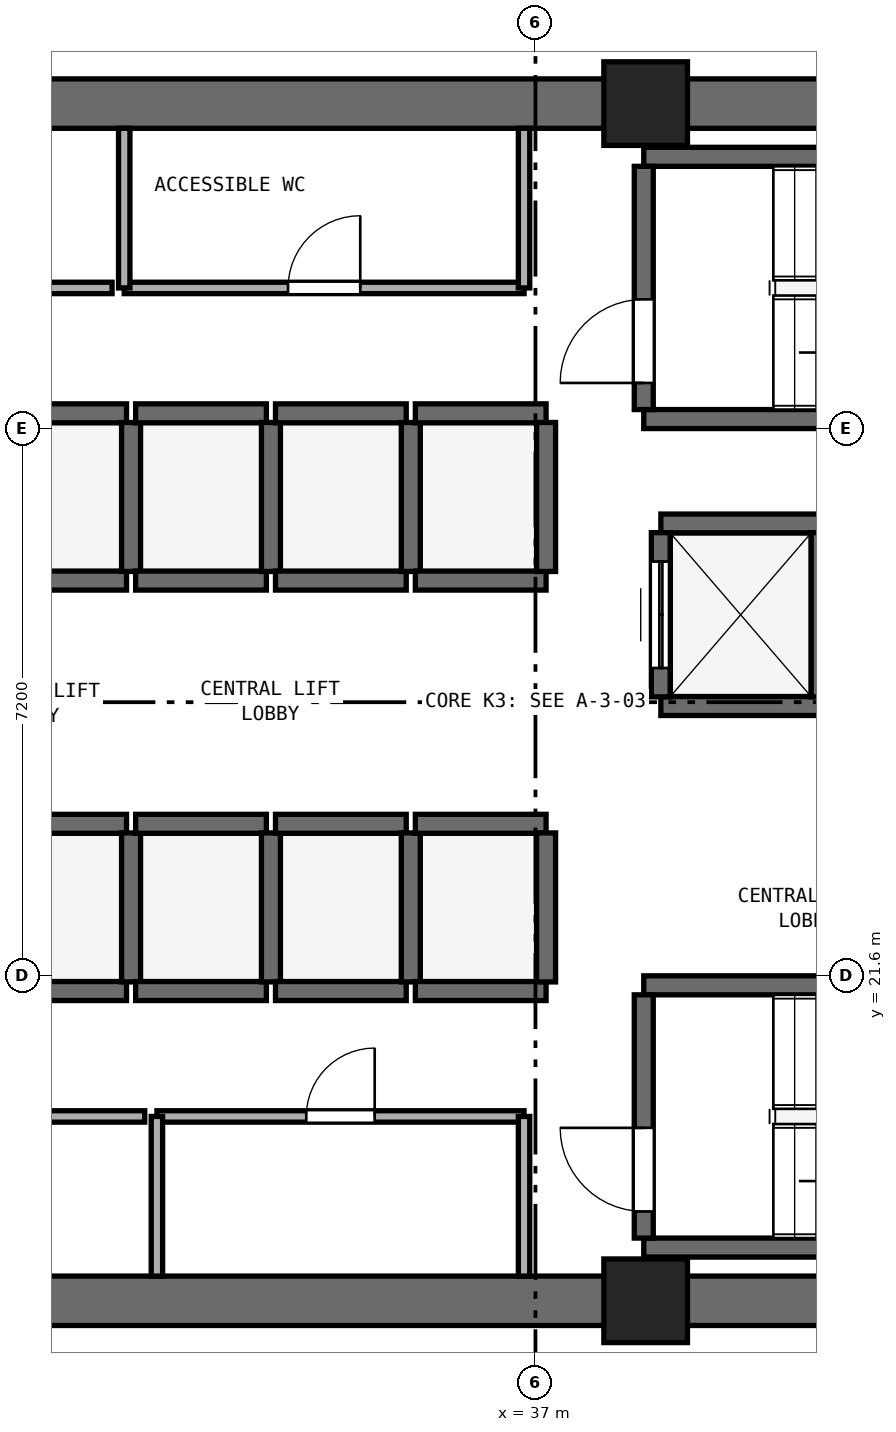
"""IFC4 building model, lengths in metres.
Left out: names, types, materials, properties, quantities, classifications, styles, units other than length and angle.
Written with IfcOpenShell. Run it as: python <this file> out.ifc"""

import sys

from ifc_helpers import new_model, si_unit, direction, frame, frame_2d, origin, origin_2d, place, context, subcontext, project, spatial, rectangle, extrude, element, fill, save


model = new_model("IFC4")
c1 = context("Model", 3, precision=1e-05, world=origin(), true_north=direction((0.0, 1.0)))
c2 = subcontext(c1, "Body", "Model", "MODEL_VIEW")
j1 = project(units=[si_unit("LENGTHUNIT", "METRE"), si_unit("PLANEANGLEUNIT", "RADIAN")], contexts=[c1])
p1 = place(None, origin())
s1 = spatial("IfcSite", under=j1, at=p1, CompositionType="ELEMENT")
p2 = place(p1, origin())
s2 = spatial("IfcBuilding", under=s1, at=p2, CompositionType="ELEMENT")
p3 = place(p2, frame((0.0, 0.0, 74.4)))
s3 = spatial("IfcBuildingStorey", under=s2, at=p3, CompositionType="ELEMENT", Elevation=74.4)
for number, where, z_axis, x_axis in (
    (1, (25.4, 17.325, 0.0), (0.0, 0.0, 1.0), (1.0, 0.0, 0.0)),
    (2, (25.4, 33.075, 0.0), (0.0, 0.0, 1.0), (1.0, 0.0, 0.0)),
):
    element("IfcWall", number, at=place(p3, frame(where, z_axis=z_axis, x_axis=x_axis)), inside=s3, PredefinedType="SHEAR", context=c2, shape_type="SweptSolid", body=[
        extrude(rectangle(XDim=23.2, YDim=0.65, at=frame_2d((11.6, 0.0))), origin(), (0.0, 0.0, 1.0), 3.525),
    ])
for number, where, z_axis, x_axis in (
    (3, (38.45, 17.325, 0.0), (0.0, 0.0, 1.0), (1.0, 0.0, 0.0)),
    (4, (38.45, 33.075, 0.0), (0.0, 0.0, 1.0), (1.0, 0.0, 0.0)),
):
    element("IfcColumn", number, at=place(p3, frame(where, z_axis=z_axis, x_axis=x_axis)), inside=s3, PredefinedType="PILASTER", context=c2, shape_type="SweptSolid", body=[
        extrude(rectangle(XDim=1.1, YDim=1.1, at=origin_2d()), origin(), (0.0, 0.0, 1.0), 3.8),
    ])
for number, where, z_axis, x_axis in (
    (5, (38.425, 28.925, 0.0), (0.0, 0.0, 1.0), (1.0, 0.0, 0.0)),
    (6, (38.425, 32.375, 0.0), (0.0, 0.0, 1.0), (1.0, 0.0, 0.0)),
):
    element("IfcWall", number, at=place(p3, frame(where, z_axis=z_axis, x_axis=x_axis)), inside=s3, PredefinedType="SHEAR", context=c2, shape_type="SweptSolid", body=[
        extrude(rectangle(XDim=7.3, YDim=0.25, at=frame_2d((3.65, 0.0))), origin(), (0.0, 0.0, 1.0), 3.525),
    ])
p4 = place(p3, frame((38.425, 29.05, 0.0), z_axis=(0.0, 0.0, 1.0), x_axis=(0.0, 1.0, 0.0)))
e7 = element("IfcWall", 7, at=p4, inside=s3, PredefinedType="SHEAR", context=c2, shape_type="SweptSolid", body=[
    extrude(rectangle(XDim=3.2, YDim=0.25, at=frame_2d((1.6, 0.0))), origin(), (0.0, 0.0, 1.0), 3.525),
])
p5 = place(p4, frame((0.35, 0.0, 0.0)))
e8 = element("IfcOpeningElement", 8, at=p5, cuts=e7, PredefinedType="OPENING", context=c2, shape_type="SweptSolid", body=[
    extrude(rectangle(XDim=1.1, YDim=2.15, at=frame_2d((0.55, 1.075))), frame((0.0, 0.135, 0.0), z_axis=(0.0, -1.0, 0.0), x_axis=(1.0, 0.0, 0.0)), (0.0, 0.0, 1.0), 0.27),
])
for number, where, z_axis, x_axis in (
    (9, (38.425, 18.025, 0.0), (0.0, 0.0, 1.0), (1.0, 0.0, 0.0)),
    (10, (38.425, 21.475, 0.0), (0.0, 0.0, 1.0), (1.0, 0.0, 0.0)),
):
    element("IfcWall", number, at=place(p3, frame(where, z_axis=z_axis, x_axis=x_axis)), inside=s3, PredefinedType="SHEAR", context=c2, shape_type="SweptSolid", body=[
        extrude(rectangle(XDim=7.3, YDim=0.25, at=frame_2d((3.65, 0.0))), origin(), (0.0, 0.0, 1.0), 3.525),
    ])
p6 = place(p3, frame((38.425, 18.15, 0.0), z_axis=(0.0, 0.0, 1.0), x_axis=(0.0, 1.0, 0.0)))
e11 = element("IfcWall", 11, at=p6, inside=s3, PredefinedType="SHEAR", context=c2, shape_type="SweptSolid", body=[
    extrude(rectangle(XDim=3.2, YDim=0.25, at=frame_2d((1.6, 0.0))), origin(), (0.0, 0.0, 1.0), 3.525),
])
p7 = place(p6, frame((0.35, 0.0, 0.0)))
e12 = element("IfcOpeningElement", 12, at=p7, cuts=e11, PredefinedType="OPENING", context=c2, shape_type="SweptSolid", body=[
    extrude(rectangle(XDim=1.1, YDim=2.15, at=frame_2d((0.55, 1.075))), frame((0.0, 0.135, 0.0), z_axis=(0.0, -1.0, 0.0), x_axis=(1.0, 0.0, 0.0)), (0.0, 0.0, 1.0), 0.27),
])
for number, where, z_axis, x_axis in (
    (13, (29.9, 21.4, 0.0), (0.0, 0.0, 1.0), (1.0, 0.0, 0.0)),
    (14, (29.9, 23.6, 0.0), (0.0, 0.0, 1.0), (1.0, 0.0, 0.0)),
):
    element("IfcWall", number, at=place(p3, frame(where, z_axis=z_axis, x_axis=x_axis)), inside=s3, PredefinedType="SHEAR", context=c2, shape_type="SweptSolid", body=[
        extrude(rectangle(XDim=1.72, YDim=0.25, at=frame_2d((0.86, 0.0))), origin(), (0.0, 0.0, 1.0), 3.525),
    ])
p8 = place(p3, frame((31.68, 21.52, 0.0), z_axis=(0.0, 0.0, 1.0), x_axis=(0.0, 1.0, 0.0)))
e15 = element("IfcWall", 15, at=p8, inside=s3, PredefinedType="SHEAR", context=c2, shape_type="SweptSolid", body=[
    extrude(rectangle(XDim=1.96, YDim=0.25, at=frame_2d((0.98, 0.0))), origin(), (0.0, 0.0, 1.0), 3.525),
])
for number, where, z_axis, x_axis in (
    (16, (31.74, 21.4, 0.0), (0.0, 0.0, 1.0), (1.0, 0.0, 0.0)),
    (17, (31.74, 23.6, 0.0), (0.0, 0.0, 1.0), (1.0, 0.0, 0.0)),
):
    element("IfcWall", number, at=place(p3, frame(where, z_axis=z_axis, x_axis=x_axis)), inside=s3, PredefinedType="SHEAR", context=c2, shape_type="SweptSolid", body=[
        extrude(rectangle(XDim=1.72, YDim=0.25, at=frame_2d((0.86, 0.0))), origin(), (0.0, 0.0, 1.0), 3.525),
    ])
p9 = place(p3, frame((33.52, 21.52, 0.0), z_axis=(0.0, 0.0, 1.0), x_axis=(0.0, 1.0, 0.0)))
e18 = element("IfcWall", 18, at=p9, inside=s3, PredefinedType="SHEAR", context=c2, shape_type="SweptSolid", body=[
    extrude(rectangle(XDim=1.96, YDim=0.25, at=frame_2d((0.98, 0.0))), origin(), (0.0, 0.0, 1.0), 3.525),
])
for number, where, z_axis, x_axis in (
    (19, (33.58, 21.4, 0.0), (0.0, 0.0, 1.0), (1.0, 0.0, 0.0)),
    (20, (33.58, 23.6, 0.0), (0.0, 0.0, 1.0), (1.0, 0.0, 0.0)),
):
    element("IfcWall", number, at=place(p3, frame(where, z_axis=z_axis, x_axis=x_axis)), inside=s3, PredefinedType="SHEAR", context=c2, shape_type="SweptSolid", body=[
        extrude(rectangle(XDim=1.72, YDim=0.25, at=frame_2d((0.86, 0.0))), origin(), (0.0, 0.0, 1.0), 3.525),
    ])
p10 = place(p3, frame((35.36, 21.52, 0.0), z_axis=(0.0, 0.0, 1.0), x_axis=(0.0, 1.0, 0.0)))
e21 = element("IfcWall", 21, at=p10, inside=s3, PredefinedType="SHEAR", context=c2, shape_type="SweptSolid", body=[
    extrude(rectangle(XDim=1.96, YDim=0.25, at=frame_2d((0.98, 0.0))), origin(), (0.0, 0.0, 1.0), 3.525),
])
for number, where, z_axis, x_axis in (
    (22, (35.42, 21.4, 0.0), (0.0, 0.0, 1.0), (1.0, 0.0, 0.0)),
    (23, (35.42, 23.6, 0.0), (0.0, 0.0, 1.0), (1.0, 0.0, 0.0)),
):
    element("IfcWall", number, at=place(p3, frame(where, z_axis=z_axis, x_axis=x_axis)), inside=s3, PredefinedType="SHEAR", context=c2, shape_type="SweptSolid", body=[
        extrude(rectangle(XDim=1.72, YDim=0.25, at=frame_2d((0.86, 0.0))), origin(), (0.0, 0.0, 1.0), 3.525),
    ])
p11 = place(p3, frame((37.14, 21.52, 0.0), z_axis=(0.0, 0.0, 1.0), x_axis=(0.0, 1.0, 0.0)))
e24 = element("IfcWall", 24, at=p11, inside=s3, PredefinedType="SHEAR", context=c2, shape_type="SweptSolid", body=[
    extrude(rectangle(XDim=1.96, YDim=0.25, at=frame_2d((0.98, 0.0))), origin(), (0.0, 0.0, 1.0), 3.525),
])
for number, where, z_axis, x_axis in (
    (25, (29.9, 26.8, 0.0), (0.0, 0.0, 1.0), (1.0, 0.0, 0.0)),
    (26, (29.9, 29.0, 0.0), (0.0, 0.0, 1.0), (1.0, 0.0, 0.0)),
):
    element("IfcWall", number, at=place(p3, frame(where, z_axis=z_axis, x_axis=x_axis)), inside=s3, PredefinedType="SHEAR", context=c2, shape_type="SweptSolid", body=[
        extrude(rectangle(XDim=1.72, YDim=0.25, at=frame_2d((0.86, 0.0))), origin(), (0.0, 0.0, 1.0), 3.525),
    ])
p12 = place(p3, frame((31.68, 26.92, 0.0), z_axis=(0.0, 0.0, 1.0), x_axis=(0.0, 1.0, 0.0)))
e27 = element("IfcWall", 27, at=p12, inside=s3, PredefinedType="SHEAR", context=c2, shape_type="SweptSolid", body=[
    extrude(rectangle(XDim=1.96, YDim=0.25, at=frame_2d((0.98, 0.0))), origin(), (0.0, 0.0, 1.0), 3.525),
])
for number, where, z_axis, x_axis in (
    (28, (31.74, 26.8, 0.0), (0.0, 0.0, 1.0), (1.0, 0.0, 0.0)),
    (29, (31.74, 29.0, 0.0), (0.0, 0.0, 1.0), (1.0, 0.0, 0.0)),
):
    element("IfcWall", number, at=place(p3, frame(where, z_axis=z_axis, x_axis=x_axis)), inside=s3, PredefinedType="SHEAR", context=c2, shape_type="SweptSolid", body=[
        extrude(rectangle(XDim=1.72, YDim=0.25, at=frame_2d((0.86, 0.0))), origin(), (0.0, 0.0, 1.0), 3.525),
    ])
p13 = place(p3, frame((33.52, 26.92, 0.0), z_axis=(0.0, 0.0, 1.0), x_axis=(0.0, 1.0, 0.0)))
e30 = element("IfcWall", 30, at=p13, inside=s3, PredefinedType="SHEAR", context=c2, shape_type="SweptSolid", body=[
    extrude(rectangle(XDim=1.96, YDim=0.25, at=frame_2d((0.98, 0.0))), origin(), (0.0, 0.0, 1.0), 3.525),
])
for number, where, z_axis, x_axis in (
    (31, (33.58, 26.8, 0.0), (0.0, 0.0, 1.0), (1.0, 0.0, 0.0)),
    (32, (33.58, 29.0, 0.0), (0.0, 0.0, 1.0), (1.0, 0.0, 0.0)),
):
    element("IfcWall", number, at=place(p3, frame(where, z_axis=z_axis, x_axis=x_axis)), inside=s3, PredefinedType="SHEAR", context=c2, shape_type="SweptSolid", body=[
        extrude(rectangle(XDim=1.72, YDim=0.25, at=frame_2d((0.86, 0.0))), origin(), (0.0, 0.0, 1.0), 3.525),
    ])
p14 = place(p3, frame((35.36, 26.92, 0.0), z_axis=(0.0, 0.0, 1.0), x_axis=(0.0, 1.0, 0.0)))
e33 = element("IfcWall", 33, at=p14, inside=s3, PredefinedType="SHEAR", context=c2, shape_type="SweptSolid", body=[
    extrude(rectangle(XDim=1.96, YDim=0.25, at=frame_2d((0.98, 0.0))), origin(), (0.0, 0.0, 1.0), 3.525),
])
for number, where, z_axis, x_axis in (
    (34, (35.42, 26.8, 0.0), (0.0, 0.0, 1.0), (1.0, 0.0, 0.0)),
    (35, (35.42, 29.0, 0.0), (0.0, 0.0, 1.0), (1.0, 0.0, 0.0)),
):
    element("IfcWall", number, at=place(p3, frame(where, z_axis=z_axis, x_axis=x_axis)), inside=s3, PredefinedType="SHEAR", context=c2, shape_type="SweptSolid", body=[
        extrude(rectangle(XDim=1.72, YDim=0.25, at=frame_2d((0.86, 0.0))), origin(), (0.0, 0.0, 1.0), 3.525),
    ])
p15 = place(p3, frame((37.14, 26.92, 0.0), z_axis=(0.0, 0.0, 1.0), x_axis=(0.0, 1.0, 0.0)))
e36 = element("IfcWall", 36, at=p15, inside=s3, PredefinedType="SHEAR", context=c2, shape_type="SweptSolid", body=[
    extrude(rectangle(XDim=1.96, YDim=0.25, at=frame_2d((0.98, 0.0))), origin(), (0.0, 0.0, 1.0), 3.525),
])
for number, where, z_axis, x_axis in (
    (37, (38.65, 25.15, 0.0), (0.0, 0.0, 1.0), (1.0, 0.0, 0.0)),
    (38, (38.65, 27.55, 0.0), (0.0, 0.0, 1.0), (1.0, 0.0, 0.0)),
):
    element("IfcWall", number, at=place(p3, frame(where, z_axis=z_axis, x_axis=x_axis)), inside=s3, PredefinedType="SHEAR", context=c2, shape_type="SweptSolid", body=[
        extrude(rectangle(XDim=2.1, YDim=0.25, at=frame_2d((1.05, 0.0))), origin(), (0.0, 0.0, 1.0), 3.525),
    ])
p16 = place(p3, frame((38.65, 25.27, 0.0), z_axis=(0.0, 0.0, 1.0), x_axis=(0.0, 1.0, 0.0)))
e39 = element("IfcWall", 39, at=p16, inside=s3, PredefinedType="SHEAR", context=c2, shape_type="SweptSolid", body=[
    extrude(rectangle(XDim=2.16, YDim=0.25, at=frame_2d((1.08, 0.0))), origin(), (0.0, 0.0, 1.0), 3.525),
])
p17 = place(p16, frame((0.38, 0.0, 0.0)))
e40 = element("IfcOpeningElement", 40, at=p17, cuts=e39, PredefinedType="OPENING", context=c2, shape_type="SweptSolid", body=[
    extrude(rectangle(XDim=1.4, YDim=2.2, at=frame_2d((0.7, 1.1))), frame((0.0, 0.135, 0.0), z_axis=(0.0, -1.0, 0.0), x_axis=(1.0, 0.0, 0.0)), (0.0, 0.0, 1.0), 0.27),
])
p18 = place(p3, frame((40.75, 25.27, 0.0), z_axis=(0.0, 0.0, 1.0), x_axis=(0.0, 1.0, 0.0)))
e41 = element("IfcWall", 41, at=p18, inside=s3, PredefinedType="SHEAR", context=c2, shape_type="SweptSolid", body=[
    extrude(rectangle(XDim=2.16, YDim=0.25, at=frame_2d((1.08, 0.0))), origin(), (0.0, 0.0, 1.0), 3.525),
])
p19 = place(p3, frame((26.17, 30.65, 0.0), z_axis=(0.0, 0.0, 1.0), x_axis=(1.0, 0.0, 0.0)))
e42 = element("IfcWall", 42, at=p19, inside=s3, PredefinedType="PARTITIONING", context=c2, shape_type="SweptSolid", body=[
    extrude(rectangle(XDim=5.26, YDim=0.15, at=frame_2d((2.63, 0.0))), origin(), (0.0, 0.0, 1.0), 3.525),
])
p20 = place(p19, frame((2.155, 0.0, 0.0)))
e43 = element("IfcOpeningElement", 43, at=p20, cuts=e42, PredefinedType="OPENING", context=c2, shape_type="SweptSolid", body=[
    extrude(rectangle(XDim=0.95, YDim=2.1, at=frame_2d((0.475, 1.05))), frame((0.0, 0.085, 0.0), z_axis=(0.0, -1.0, 0.0), x_axis=(1.0, 0.0, 0.0)), (0.0, 0.0, 1.0), 0.17),
])
p21 = place(p3, frame((31.59, 30.65, 0.0), z_axis=(0.0, 0.0, 1.0), x_axis=(1.0, 0.0, 0.0)))
e44 = element("IfcWall", 44, at=p21, inside=s3, PredefinedType="PARTITIONING", context=c2, shape_type="SweptSolid", body=[
    extrude(rectangle(XDim=5.26, YDim=0.15, at=frame_2d((2.63, 0.0))), origin(), (0.0, 0.0, 1.0), 3.525),
])
p22 = place(p21, frame((2.155, 0.0, 0.0)))
e45 = element("IfcOpeningElement", 45, at=p22, cuts=e44, PredefinedType="OPENING", context=c2, shape_type="SweptSolid", body=[
    extrude(rectangle(XDim=0.95, YDim=2.1, at=frame_2d((0.475, 1.05))), frame((0.0, 0.085, 0.0), z_axis=(0.0, -1.0, 0.0), x_axis=(1.0, 0.0, 0.0)), (0.0, 0.0, 1.0), 0.17),
])
for number, where, z_axis, x_axis in (
    (46, (31.59, 30.65, 0.0), (0.0, 0.0, 1.0), (0.0, 1.0, 0.0)),
    (47, (36.85, 30.65, 0.0), (0.0, 0.0, 1.0), (0.0, 1.0, 0.0)),
):
    element("IfcWall", number, at=place(p3, frame(where, z_axis=z_axis, x_axis=x_axis)), inside=s3, PredefinedType="PARTITIONING", context=c2, shape_type="SweptSolid", body=[
        extrude(rectangle(XDim=2.1, YDim=0.15, at=frame_2d((1.05, 0.0))), origin(), (0.0, 0.0, 1.0), 3.525),
    ])
p23 = place(p3, frame((26.17, 19.75, 0.0), z_axis=(0.0, 0.0, 1.0), x_axis=(1.0, 0.0, 0.0)))
e48 = element("IfcWall", 48, at=p23, inside=s3, PredefinedType="PARTITIONING", context=c2, shape_type="SweptSolid", body=[
    extrude(rectangle(XDim=5.69, YDim=0.15, at=frame_2d((2.845, 0.0))), origin(), (0.0, 0.0, 1.0), 3.525),
])
p24 = place(p23, frame((2.37, 0.0, 0.0)))
e49 = element("IfcOpeningElement", 49, at=p24, cuts=e48, PredefinedType="OPENING", context=c2, shape_type="SweptSolid", body=[
    extrude(rectangle(XDim=0.95, YDim=2.1, at=frame_2d((0.475, 1.05))), frame((0.0, 0.085, 0.0), z_axis=(0.0, -1.0, 0.0), x_axis=(1.0, 0.0, 0.0)), (0.0, 0.0, 1.0), 0.17),
])
p25 = place(p3, frame((32.02, 19.75, 0.0), z_axis=(0.0, 0.0, 1.0), x_axis=(1.0, 0.0, 0.0)))
e50 = element("IfcWall", 50, at=p25, inside=s3, PredefinedType="PARTITIONING", context=c2, shape_type="SweptSolid", body=[
    extrude(rectangle(XDim=4.83, YDim=0.15, at=frame_2d((2.415, 0.0))), origin(), (0.0, 0.0, 1.0), 3.525),
])
p26 = place(p25, frame((1.965, 0.0, 0.0)))
e51 = element("IfcOpeningElement", 51, at=p26, cuts=e50, PredefinedType="OPENING", context=c2, shape_type="SweptSolid", body=[
    extrude(rectangle(XDim=0.9, YDim=2.1, at=frame_2d((0.45, 1.05))), frame((0.0, 0.085, 0.0), z_axis=(0.0, -1.0, 0.0), x_axis=(1.0, 0.0, 0.0)), (0.0, 0.0, 1.0), 0.17),
])
for number, where, z_axis, x_axis in (
    (52, (32.02, 17.65, 0.0), (0.0, 0.0, 1.0), (0.0, 1.0, 0.0)),
    (53, (36.85, 17.65, 0.0), (0.0, 0.0, 1.0), (0.0, 1.0, 0.0)),
):
    element("IfcWall", number, at=place(p3, frame(where, z_axis=z_axis, x_axis=x_axis)), inside=s3, PredefinedType="PARTITIONING", context=c2, shape_type="SweptSolid", body=[
        extrude(rectangle(XDim=2.1, YDim=0.15, at=frame_2d((1.05, 0.0))), origin(), (0.0, 0.0, 1.0), 3.525),
    ])
p27 = place(p5, origin())
e54 = element("IfcDoor", 54, at=p27, inside=s3, OperationType="SINGLE_SWING_LEFT", PredefinedType="DOOR", context=c2, shape_type="SweptSolid", body=[
    extrude(rectangle(XDim=1.1, YDim=2.15, at=frame_2d((0.55, 1.075))), frame((0.0, 0.025, 0.0), z_axis=(0.0, -1.0, 0.0), x_axis=(1.0, 0.0, 0.0)), (0.0, 0.0, 1.0), 0.05),
])
fill(e8, e54)
p28 = place(p7, origin())
e55 = element("IfcDoor", 55, at=p28, inside=s3, OperationType="SINGLE_SWING_RIGHT", PredefinedType="DOOR", context=c2, shape_type="SweptSolid", body=[
    extrude(rectangle(XDim=1.1, YDim=2.15, at=frame_2d((0.55, 1.075))), frame((0.0, 0.025, 0.0), z_axis=(0.0, -1.0, 0.0), x_axis=(1.0, 0.0, 0.0)), (0.0, 0.0, 1.0), 0.05),
])
fill(e12, e55)
p29 = place(p17, origin())
e56 = element("IfcDoor", 56, at=p29, inside=s3, OperationType="DOUBLE_DOOR_SLIDING", PredefinedType="DOOR", context=c2, shape_type="SweptSolid", body=[
    extrude(rectangle(XDim=1.4, YDim=2.2, at=frame_2d((0.7, 1.1))), frame((0.0, 0.025, 0.0), z_axis=(0.0, -1.0, 0.0), x_axis=(1.0, 0.0, 0.0)), (0.0, 0.0, 1.0), 0.05),
])
fill(e40, e56)
p30 = place(p22, origin())
e57 = element("IfcDoor", 57, at=p30, inside=s3, OperationType="SINGLE_SWING_RIGHT", PredefinedType="DOOR", context=c2, shape_type="SweptSolid", body=[
    extrude(rectangle(XDim=0.95, YDim=2.1, at=frame_2d((0.475, 1.05))), frame((0.0, 0.025, 0.0), z_axis=(0.0, -1.0, 0.0), x_axis=(1.0, 0.0, 0.0)), (0.0, 0.0, 1.0), 0.05),
])
fill(e45, e57)
p31 = place(p26, origin())
e58 = element("IfcDoor", 58, at=p31, inside=s3, OperationType="SINGLE_SWING_RIGHT", PredefinedType="DOOR", context=c2, shape_type="SweptSolid", body=[
    extrude(rectangle(XDim=0.9, YDim=2.1, at=frame_2d((0.45, 1.05))), frame((0.0, 0.025, 0.0), z_axis=(0.0, -1.0, 0.0), x_axis=(1.0, 0.0, 0.0)), (0.0, 0.0, 1.0), 0.05),
])
fill(e51, e58)
save(model, sys.argv[1])
